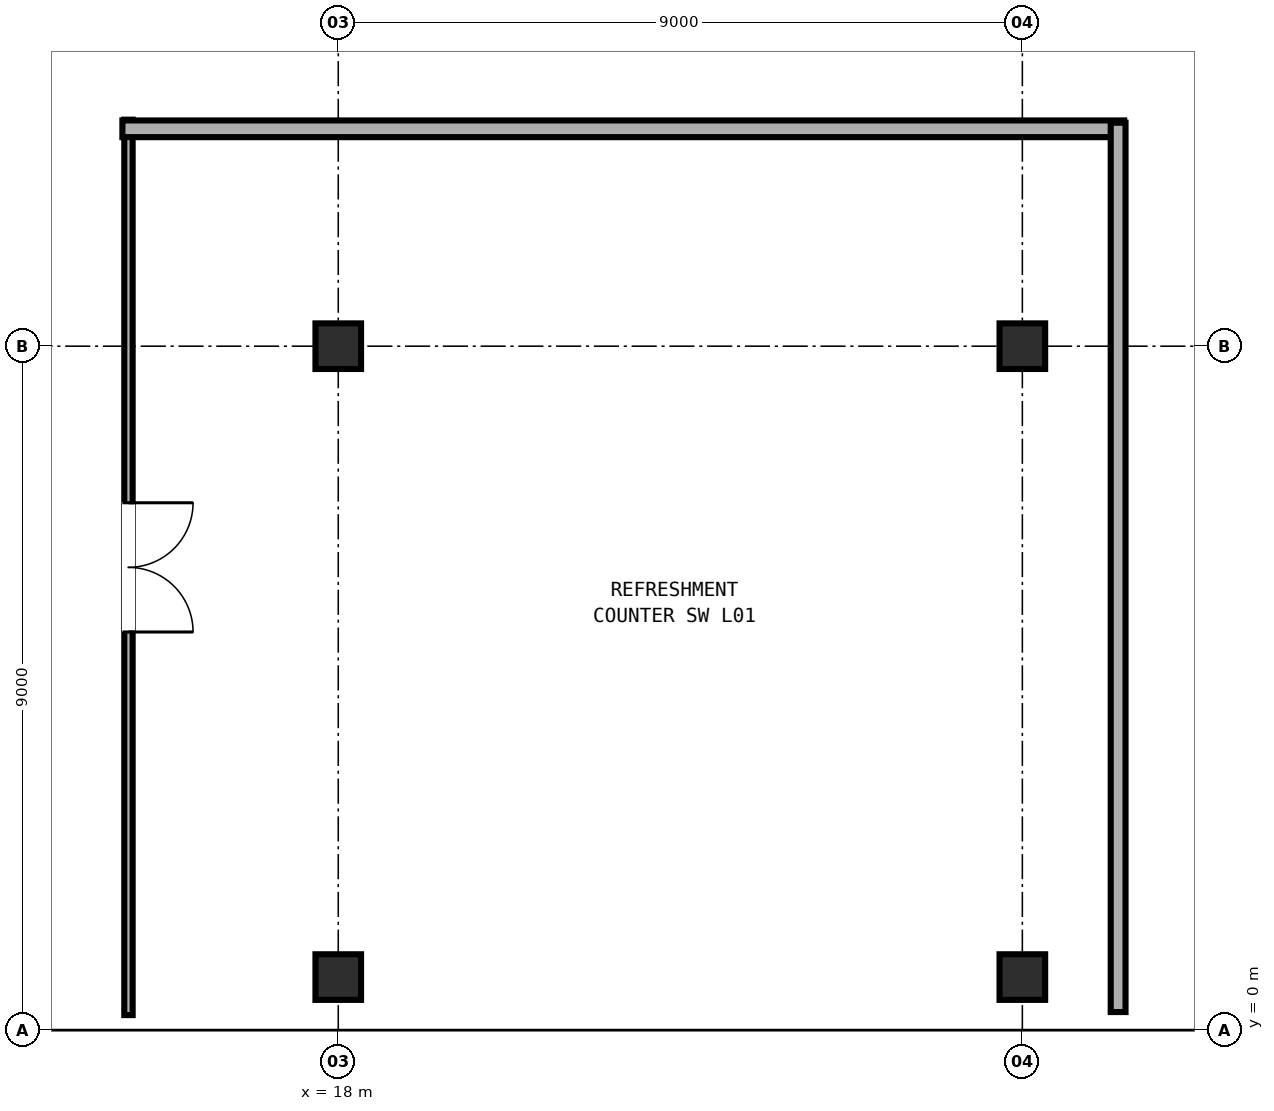
"""IFC4 building model, lengths in metres.
Left out: names, types, materials, properties, quantities, classifications, styles, units other than length and angle.
Written with IfcOpenShell. Run it as: python <this file> out.ifc"""

import sys

from ifc_helpers import new_model, si_unit, direction, frame, frame_2d, origin, origin_2d, place, context, subcontext, project, spatial, rectangle, extrude, element, fill, save


model = new_model("IFC4")
c1 = context("Model", 3, precision=1e-05, world=origin(), true_north=direction((0.0, 1.0)))
c2 = subcontext(c1, "Body", "Model", "MODEL_VIEW")
j1 = project(units=[si_unit("LENGTHUNIT", "METRE"), si_unit("PLANEANGLEUNIT", "RADIAN")], contexts=[c1])
p1 = place(None, origin())
s1 = spatial("IfcSite", under=j1, at=p1, CompositionType="ELEMENT")
p2 = place(p1, origin())
s2 = spatial("IfcBuilding", under=s1, at=p2, CompositionType="ELEMENT")
p3 = place(p2, frame((0.0, 0.0, 4.8)))
s3 = spatial("IfcBuildingStorey", under=s2, at=p3, CompositionType="ELEMENT", Elevation=4.8)
for number, where, z_axis, x_axis in (
    (1, (18.0, 0.7, 0.0), (0.0, 0.0, 1.0), (1.0, 0.0, 0.0)),
    (2, (18.0, 9.0, 0.0), (0.0, 0.0, 1.0), (1.0, 0.0, 0.0)),
    (3, (27.0, 0.7, 0.0), (0.0, 0.0, 1.0), (1.0, 0.0, 0.0)),
    (4, (27.0, 9.0, 0.0), (0.0, 0.0, 1.0), (1.0, 0.0, 0.0)),
):
    element("IfcColumn", number, at=place(p3, frame(where, z_axis=z_axis, x_axis=x_axis)), inside=s3, PredefinedType="COLUMN", context=c2, shape_type="SweptSolid", body=[
        extrude(rectangle(XDim=0.6, YDim=0.6, at=origin_2d()), origin(), (0.0, 0.0, 1.0), 4.8),
    ])
p4 = place(p3, frame((35.695, 0.2, 0.0), z_axis=(0.0, 0.0, 1.0), x_axis=(-1.0, 0.0, 0.0)))
e5 = element("IfcWall", 5, at=p4, inside=s3, PredefinedType="SOLIDWALL", context=c2, shape_type="SweptSolid", body=[
    extrude(rectangle(XDim=8.39, YDim=0.38, at=frame_2d((4.195, 0.0))), origin(), (0.0, 0.0, 1.0), 3.58),
])
p5 = place(p4, frame((3.57, 0.0, 0.9)))
e6 = element("IfcOpeningElement", 6, at=p5, cuts=e5, PredefinedType="OPENING", context=c2, shape_type="SweptSolid", body=[
    extrude(rectangle(XDim=1.25, YDim=1.8, at=frame_2d((0.625, 0.9))), frame((0.0, 0.2, 0.0), z_axis=(0.0, -1.0, 0.0), x_axis=(1.0, 0.0, 0.0)), (0.0, 0.0, 1.0), 0.4),
])
p6 = place(p3, frame((26.695, 0.2, 0.0), z_axis=(0.0, 0.0, 1.0), x_axis=(-1.0, 0.0, 0.0)))
e7 = element("IfcWall", 7, at=p6, inside=s3, PredefinedType="SOLIDWALL", context=c2, shape_type="SweptSolid", body=[
    extrude(rectangle(XDim=8.39, YDim=0.36, at=frame_2d((4.195, 0.0))), origin(), (0.0, 0.0, 1.0), 3.58),
])
p7 = place(p6, frame((3.47, 0.0, 0.9)))
e8 = element("IfcOpeningElement", 8, at=p7, cuts=e7, PredefinedType="OPENING", context=c2, shape_type="SweptSolid", body=[
    extrude(rectangle(XDim=1.45, YDim=1.85, at=frame_2d((0.725, 0.925))), frame((0.0, 0.19, 0.0), z_axis=(0.0, -1.0, 0.0), x_axis=(1.0, 0.0, 0.0)), (0.0, 0.0, 1.0), 0.38),
])
p8 = place(p3, frame((17.695, 0.2, 0.0), z_axis=(0.0, 0.0, 1.0), x_axis=(-1.0, 0.0, 0.0)))
e9 = element("IfcWall", 9, at=p8, inside=s3, PredefinedType="SOLIDWALL", context=c2, shape_type="SweptSolid", body=[
    extrude(rectangle(XDim=8.39, YDim=0.34, at=frame_2d((4.195, 0.0))), origin(), (0.0, 0.0, 1.0), 3.58),
])
p9 = place(p8, frame((3.37, 0.0, 0.9)))
e10 = element("IfcOpeningElement", 10, at=p9, cuts=e9, PredefinedType="OPENING", context=c2, shape_type="SweptSolid", body=[
    extrude(rectangle(XDim=1.65, YDim=1.9, at=frame_2d((0.825, 0.95))), frame((0.0, 0.18, 0.0), z_axis=(0.0, -1.0, 0.0), x_axis=(1.0, 0.0, 0.0)), (0.0, 0.0, 1.0), 0.36),
])
p10 = place(p3, frame((15.24, 11.98, 0.0), z_axis=(0.0, 0.0, 1.0), x_axis=(0.0, -1.0, 0.0)))
e11 = element("IfcWall", 11, at=p10, inside=s3, PredefinedType="PARTITIONING", context=c2, shape_type="SweptSolid", body=[
    extrude(rectangle(XDim=11.78, YDim=0.11, at=frame_2d((5.89, 0.0))), origin(), (0.0, 0.0, 1.0), 3.28),
])
p11 = place(p10, frame((5.04, 0.0, 0.0)))
e12 = element("IfcOpeningElement", 12, at=p11, cuts=e11, PredefinedType="OPENING", context=c2, shape_type="SweptSolid", body=[
    extrude(rectangle(XDim=1.7, YDim=2.2, at=frame_2d((0.85, 1.1))), frame((0.0, 0.065, 0.0), z_axis=(0.0, -1.0, 0.0), x_axis=(1.0, 0.0, 0.0)), (0.0, 0.0, 1.0), 0.13),
])
p12 = place(p3, frame((15.16, 11.86, 0.0), z_axis=(0.0, 0.0, 1.0), x_axis=(1.0, 0.0, 0.0)))
e13 = element("IfcWall", 13, at=p12, inside=s3, PredefinedType="PARTITIONING", context=c2, shape_type="SweptSolid", body=[
    extrude(rectangle(XDim=13.18, YDim=0.22, at=frame_2d((6.59, 0.0))), origin(), (0.0, 0.0, 1.0), 3.28),
])
p13 = place(p3, frame((28.26, 11.94, 0.0), z_axis=(0.0, 0.0, 1.0), x_axis=(0.0, -1.0, 0.0)))
e14 = element("IfcWall", 14, at=p13, inside=s3, PredefinedType="PARTITIONING", context=c2, shape_type="SweptSolid", body=[
    extrude(rectangle(XDim=11.7, YDim=0.195, at=frame_2d((5.85, 0.0))), origin(), (0.0, 0.0, 1.0), 3.28),
])
p14 = place(p7, origin())
e15 = element("IfcWindow", 15, at=p14, inside=s3, PartitioningType="SINGLE_PANEL", PredefinedType="WINDOW", context=c2, shape_type="SweptSolid", body=[
    extrude(rectangle(XDim=1.45, YDim=1.85, at=frame_2d((0.725, 0.925))), frame((0.0, 0.03, 0.0), z_axis=(0.0, -1.0, 0.0), x_axis=(1.0, 0.0, 0.0)), (0.0, 0.0, 1.0), 0.06),
])
fill(e8, e15)
p15 = place(p9, origin())
e16 = element("IfcWindow", 16, at=p15, inside=s3, PartitioningType="SINGLE_PANEL", PredefinedType="WINDOW", context=c2, shape_type="SweptSolid", body=[
    extrude(rectangle(XDim=1.65, YDim=1.9, at=frame_2d((0.825, 0.95))), frame((0.0, 0.03, 0.0), z_axis=(0.0, -1.0, 0.0), x_axis=(1.0, 0.0, 0.0)), (0.0, 0.0, 1.0), 0.06),
])
fill(e10, e16)
p16 = place(p11, origin())
e17 = element("IfcDoor", 17, at=p16, inside=s3, OperationType="DOUBLE_DOOR_SINGLE_SWING", PredefinedType="DOOR", context=c2, shape_type="SweptSolid", body=[
    extrude(rectangle(XDim=1.7, YDim=2.2, at=frame_2d((0.85, 1.1))), frame((0.0, 0.025, 0.0), z_axis=(0.0, -1.0, 0.0), x_axis=(1.0, 0.0, 0.0)), (0.0, 0.0, 1.0), 0.05),
])
fill(e12, e17)
save(model, sys.argv[1])
